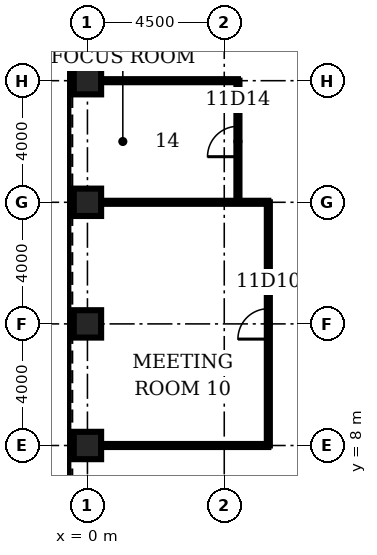
"""IFC4 building model, lengths in metres.
Left out: names, types, materials, properties, quantities, classifications, styles, units other than length and angle.
Written with IfcOpenShell. Run it as: python <this file> out.ifc"""

import sys

from ifc_helpers import new_model, si_unit, direction, frame, frame_2d, origin, origin_2d, place, context, subcontext, project, spatial, rectangle, hollow_rectangle, extrude, element, fill, save


model = new_model("IFC4")
c1 = context("Model", 3, precision=1e-05, world=origin(), true_north=direction((0.0, 1.0)))
c2 = subcontext(c1, "Body", "Model", "MODEL_VIEW")
j1 = project(units=[si_unit("LENGTHUNIT", "METRE"), si_unit("PLANEANGLEUNIT", "RADIAN")], contexts=[c1])
p1 = place(None, origin())
s1 = spatial("IfcSite", under=j1, at=p1, CompositionType="ELEMENT")
p2 = place(p1, origin())
s2 = spatial("IfcBuilding", under=s1, at=p2, CompositionType="ELEMENT")
p3 = place(p2, frame((0.0, 0.0, 54.5)))
s3 = spatial("IfcBuildingStorey", under=s2, at=p3, CompositionType="ELEMENT", Elevation=54.5)
for number, where, z_axis, x_axis in (
    (1, (0.0, 20.0, 0.0), (0.0, 0.0, 1.0), (1.0, 0.0, 0.0)),
    (2, (0.0, 16.0, 0.0), (0.0, 0.0, 1.0), (1.0, 0.0, 0.0)),
    (3, (0.0, 12.0, 0.0), (0.0, 0.0, 1.0), (1.0, 0.0, 0.0)),
    (4, (0.0, 8.0, 0.0), (0.0, 0.0, 1.0), (1.0, 0.0, 0.0)),
):
    element("IfcColumn", number, at=place(p3, frame(where, z_axis=z_axis, x_axis=x_axis)), inside=s3, PredefinedType="COLUMN", context=c2, shape_type="SweptSolid", body=[
        extrude(hollow_rectangle(XDim=0.9, YDim=0.9, WallThickness=0.12, at=origin_2d()), origin(), (0.0, 0.0, 1.0), 4.5),
    ])
for number, where, z_axis, x_axis in (
    (5, (0.45, 8.0, 0.0), (0.0, 0.0, 1.0), (1.0, 0.0, 0.0)),
    (6, (0.45, 16.0, 0.0), (0.0, 0.0, 1.0), (1.0, 0.0, 0.0)),
):
    element("IfcWall", number, at=place(p3, frame(where, z_axis=z_axis, x_axis=x_axis)), inside=s3, PredefinedType="PARTITIONING", context=c2, shape_type="SweptSolid", body=[
        extrude(rectangle(XDim=5.5, YDim=0.1, at=frame_2d((2.75, 0.0))), origin(), (0.0, 0.0, 1.0), 3.0),
    ])
p4 = place(p3, frame((0.45, 20.0, 0.0), z_axis=(0.0, 0.0, 1.0), x_axis=(1.0, 0.0, 0.0)))
e7 = element("IfcWall", 7, at=p4, inside=s3, PredefinedType="PARTITIONING", context=c2, shape_type="SweptSolid", body=[
    extrude(rectangle(XDim=4.5, YDim=0.1, at=frame_2d((2.25, 0.0))), origin(), (0.0, 0.0, 1.0), 3.0),
])
p5 = place(p3, frame((4.95, 16.0, 0.0), z_axis=(0.0, 0.0, 1.0), x_axis=(0.0, 1.0, 0.0)))
e8 = element("IfcWall", 8, at=p5, inside=s3, PredefinedType="PARTITIONING", context=c2, shape_type="SweptSolid", body=[
    extrude(rectangle(XDim=4.0, YDim=0.1, at=frame_2d((2.0, 0.0))), origin(), (0.0, 0.0, 1.0), 3.0),
])
p6 = place(p5, frame((1.5, 0.0, 0.0)))
e9 = element("IfcOpeningElement", 9, at=p6, cuts=e8, PredefinedType="OPENING", context=c2, shape_type="SweptSolid", body=[
    extrude(rectangle(XDim=1.0, YDim=2.1, at=frame_2d((0.5, 1.05))), frame((0.0, 0.06, 0.0), z_axis=(0.0, -1.0, 0.0), x_axis=(1.0, 0.0, 0.0)), (0.0, 0.0, 1.0), 0.12),
])
p7 = place(p3, frame((5.95, 8.0, 0.0), z_axis=(0.0, 0.0, 1.0), x_axis=(0.0, 1.0, 0.0)))
e10 = element("IfcWall", 10, at=p7, inside=s3, PredefinedType="PARTITIONING", context=c2, shape_type="SweptSolid", body=[
    extrude(rectangle(XDim=8.0, YDim=0.1, at=frame_2d((4.0, 0.0))), origin(), (0.0, 0.0, 1.0), 3.0),
])
p8 = place(p7, frame((3.5, 0.0, 0.0)))
e11 = element("IfcOpeningElement", 11, at=p8, cuts=e10, PredefinedType="OPENING", context=c2, shape_type="SweptSolid", body=[
    extrude(rectangle(XDim=1.0, YDim=2.1, at=frame_2d((0.5, 1.05))), frame((0.0, 0.06, 0.0), z_axis=(0.0, -1.0, 0.0), x_axis=(1.0, 0.0, 0.0)), (0.0, 0.0, 1.0), 0.12),
])
p9 = place(p8, origin())
e12 = element("IfcDoor", 12, at=p9, inside=s3, OperationType="SINGLE_SWING_LEFT", PredefinedType="DOOR", context=c2, shape_type="SweptSolid", body=[
    extrude(rectangle(XDim=1.0, YDim=2.1, at=frame_2d((0.5, 1.05))), frame((0.0, 0.025, 0.0), z_axis=(0.0, -1.0, 0.0), x_axis=(1.0, 0.0, 0.0)), (0.0, 0.0, 1.0), 0.05),
])
fill(e11, e12)
p10 = place(p6, origin())
e13 = element("IfcDoor", 13, at=p10, inside=s3, OperationType="SINGLE_SWING_LEFT", PredefinedType="DOOR", context=c2, shape_type="SweptSolid", body=[
    extrude(rectangle(XDim=1.0, YDim=2.1, at=frame_2d((0.5, 1.05))), frame((0.0, 0.025, 0.0), z_axis=(0.0, -1.0, 0.0), x_axis=(1.0, 0.0, 0.0)), (0.0, 0.0, 1.0), 0.05),
])
fill(e9, e13)
save(model, sys.argv[1])
